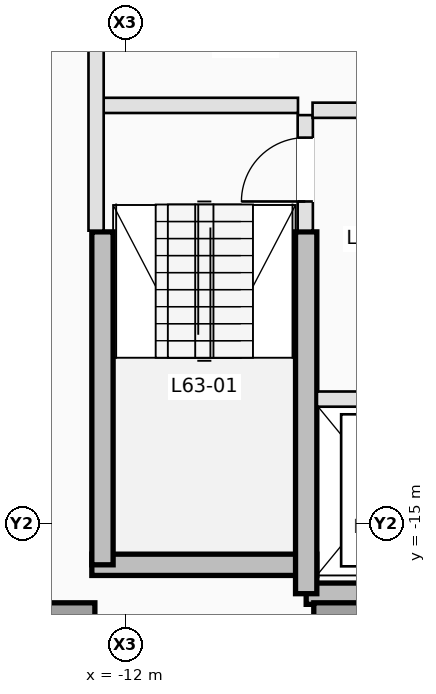
"""IFC4 building model, lengths in metres.
Left out: names, types, materials, properties, quantities, classifications, styles, units other than length and angle.
Written with IfcOpenShell. Run it as: python <this file> out.ifc"""

import sys

from ifc_helpers import new_model, si_unit, direction, frame, frame_2d, origin, origin_2d, place, context, subcontext, project, spatial, rectangle, extrude, element, fill, save


model = new_model("IFC4")
c1 = context("Model", 3, precision=1e-05, world=origin(), true_north=direction((0.0, 1.0)))
c2 = subcontext(c1, "Body", "Model", "MODEL_VIEW")
j1 = project(units=[si_unit("LENGTHUNIT", "METRE"), si_unit("PLANEANGLEUNIT", "RADIAN")], contexts=[c1])
p1 = place(None, origin())
s1 = spatial("IfcSite", under=j1, at=p1, CompositionType="ELEMENT")
p2 = place(p1, origin())
s2 = spatial("IfcBuilding", under=s1, at=p2, CompositionType="ELEMENT")
p3 = place(p2, frame((0.0, 0.0, 228.9)))
s3 = spatial("IfcBuildingStorey", under=s2, at=p3, CompositionType="ELEMENT", Elevation=228.9)
p4 = place(p3, frame((-12.55, -15.675, 0.0), z_axis=(0.0, 0.0, 1.0), x_axis=(1.0, 0.0, 0.0)))
e1 = element("IfcWall", 1, at=p4, inside=s3, PredefinedType="SHEAR", context=c2, shape_type="SweptSolid", body=[
    extrude(rectangle(XDim=3.7, YDim=0.35, at=frame_2d((1.85, 0.0))), origin(), (0.0, 0.0, 1.0), 3.5),
])
p5 = place(p3, frame((-9.025, -16.15, 0.0), z_axis=(0.0, 0.0, 1.0), x_axis=(1.0, 0.0, 0.0)))
e2 = element("IfcWall", 2, at=p5, inside=s3, PredefinedType="SHEAR", context=c2, shape_type="SweptSolid", body=[
    extrude(rectangle(XDim=5.275, YDim=0.35, at=frame_2d((2.637, 0.0))), origin(), (0.0, 0.0, 1.0), 3.5),
])
p6 = place(p3, frame((-12.375, -15.675, 0.0), z_axis=(0.0, 0.0, 1.0), x_axis=(0.0, 1.0, 0.0)))
e3 = element("IfcWall", 3, at=p6, inside=s3, PredefinedType="SHEAR", context=c2, shape_type="SweptSolid", body=[
    extrude(rectangle(XDim=5.475, YDim=0.35, at=frame_2d((2.738, 0.0))), origin(), (0.0, 0.0, 1.0), 3.5),
])
p7 = place(p3, frame((-9.025, -16.15, 0.0), z_axis=(0.0, 0.0, 1.0), x_axis=(0.0, 1.0, 0.0)))
e4 = element("IfcWall", 4, at=p7, inside=s3, PredefinedType="SHEAR", context=c2, shape_type="SweptSolid", body=[
    extrude(rectangle(XDim=5.95, YDim=0.35, at=frame_2d((2.975, 0.0))), origin(), (0.0, 0.0, 1.0), 3.5),
])
for number, where, z_axis, x_axis in (
    (5, (-12.95, -16.75, 0.0), (0.0, 0.0, 1.0), (1.0, 0.0, 0.0)),
    (6, (-8.45, -16.75, 0.0), (0.0, 0.0, 1.0), (1.0, 0.0, 0.0)),
):
    element("IfcColumn", number, at=place(p3, frame(where, z_axis=z_axis, x_axis=x_axis)), inside=s3, PredefinedType="COLUMN", context=c2, shape_type="SweptSolid", body=[
        extrude(rectangle(XDim=0.9, YDim=0.9, at=origin_2d()), origin(), (0.0, 0.0, 1.0), 3.5),
    ])
p8 = place(p3, frame((-9.04, -10.18, 0.0), z_axis=(0.0, 0.0, 1.0), x_axis=(0.0, 1.0, 0.0)))
e7 = element("IfcWall", 7, at=p8, inside=s3, PredefinedType="PARTITIONING", context=c2, shape_type="SweptSolid", body=[
    extrude(rectangle(XDim=1.9, YDim=0.25, at=frame_2d((0.95, 0.0))), origin(), (0.0, 0.0, 1.0), 3.25),
])
p9 = place(p8, frame((0.48, 0.0, 0.0)))
e8 = element("IfcOpeningElement", 8, at=p9, cuts=e7, PredefinedType="OPENING", context=c2, shape_type="SweptSolid", body=[
    extrude(rectangle(XDim=1.05, YDim=2.15, at=frame_2d((0.525, 1.075))), frame((0.0, 0.135, 0.0), z_axis=(0.0, -1.0, 0.0), x_axis=(1.0, 0.0, 0.0)), (0.0, 0.0, 1.0), 0.27),
])
p10 = place(p3, frame((-12.38, -8.12, 0.0), z_axis=(0.0, 0.0, 1.0), x_axis=(1.0, 0.0, 0.0)))
e9 = element("IfcWall", 9, at=p10, inside=s3, PredefinedType="PARTITIONING", context=c2, shape_type="SweptSolid", body=[
    extrude(rectangle(XDim=3.22, YDim=0.25, at=frame_2d((1.61, 0.0))), origin(), (0.0, 0.0, 1.0), 3.25),
])
p11 = place(p3, frame((-12.48, -10.18, 0.0), z_axis=(0.0, 0.0, 1.0), x_axis=(0.0, 1.0, 0.0)))
e10 = element("IfcWall", 10, at=p11, inside=s3, PredefinedType="PARTITIONING", context=c2, shape_type="SweptSolid", body=[
    extrude(rectangle(XDim=4.84, YDim=0.25, at=frame_2d((2.42, 0.0))), origin(), (0.0, 0.0, 1.0), 3.25),
])
p12 = place(p3, frame((-8.848, -12.95, 0.0), z_axis=(0.0, 0.0, 1.0), x_axis=(1.0, 0.0, 0.0)))
e11 = element("IfcWall", 11, at=p12, inside=s3, PredefinedType="PARTITIONING", context=c2, shape_type="SweptSolid", body=[
    extrude(rectangle(XDim=5.168, YDim=0.25, at=frame_2d((2.584, 0.0))), origin(), (0.0, 0.0, 1.0), 3.25),
])
p13 = place(p12, frame((0.748, 0.0, 0.0)))
e12 = element("IfcOpeningElement", 12, at=p13, cuts=e11, PredefinedType="OPENING", context=c2, shape_type="SweptSolid", body=[
    extrude(rectangle(XDim=1.1, YDim=2.15, at=frame_2d((0.55, 1.075))), frame((0.0, 0.135, 0.0), z_axis=(0.0, -1.0, 0.0), x_axis=(1.0, 0.0, 0.0)), (0.0, 0.0, 1.0), 0.27),
])
p14 = place(p12, frame((2.648, 0.0, 0.0)))
e13 = element("IfcOpeningElement", 13, at=p14, cuts=e11, PredefinedType="OPENING", context=c2, shape_type="SweptSolid", body=[
    extrude(rectangle(XDim=0.88, YDim=2.1, at=frame_2d((0.44, 1.05))), frame((0.0, 0.135, 0.0), z_axis=(0.0, -1.0, 0.0), x_axis=(1.0, 0.0, 0.0)), (0.0, 0.0, 1.0), 0.27),
])
p15 = place(p12, frame((4.048, 0.0, 0.0)))
e14 = element("IfcOpeningElement", 14, at=p15, cuts=e11, PredefinedType="OPENING", context=c2, shape_type="SweptSolid", body=[
    extrude(rectangle(XDim=0.88, YDim=2.1, at=frame_2d((0.44, 1.05))), frame((0.0, 0.135, 0.0), z_axis=(0.0, -1.0, 0.0), x_axis=(1.0, 0.0, 0.0)), (0.0, 0.0, 1.0), 0.27),
])
p16 = place(p3, frame((-8.92, -8.2, 0.0), z_axis=(0.0, 0.0, 1.0), x_axis=(1.0, 0.0, 0.0)))
e15 = element("IfcWall", 15, at=p16, inside=s3, PredefinedType="PARTITIONING", context=c2, shape_type="SweptSolid", body=[
    extrude(rectangle(XDim=5.24, YDim=0.25, at=frame_2d((2.62, 0.0))), origin(), (0.0, 0.0, 1.0), 3.25),
])
p17 = place(p9, origin())
e16 = element("IfcDoor", 16, at=p17, inside=s3, OperationType="SINGLE_SWING_LEFT", PredefinedType="DOOR", context=c2, shape_type="SweptSolid", body=[
    extrude(rectangle(XDim=1.05, YDim=2.15, at=frame_2d((0.525, 1.075))), frame((0.0, 0.025, 0.0), z_axis=(0.0, -1.0, 0.0), x_axis=(1.0, 0.0, 0.0)), (0.0, 0.0, 1.0), 0.05),
])
fill(e8, e16)
save(model, sys.argv[1])
